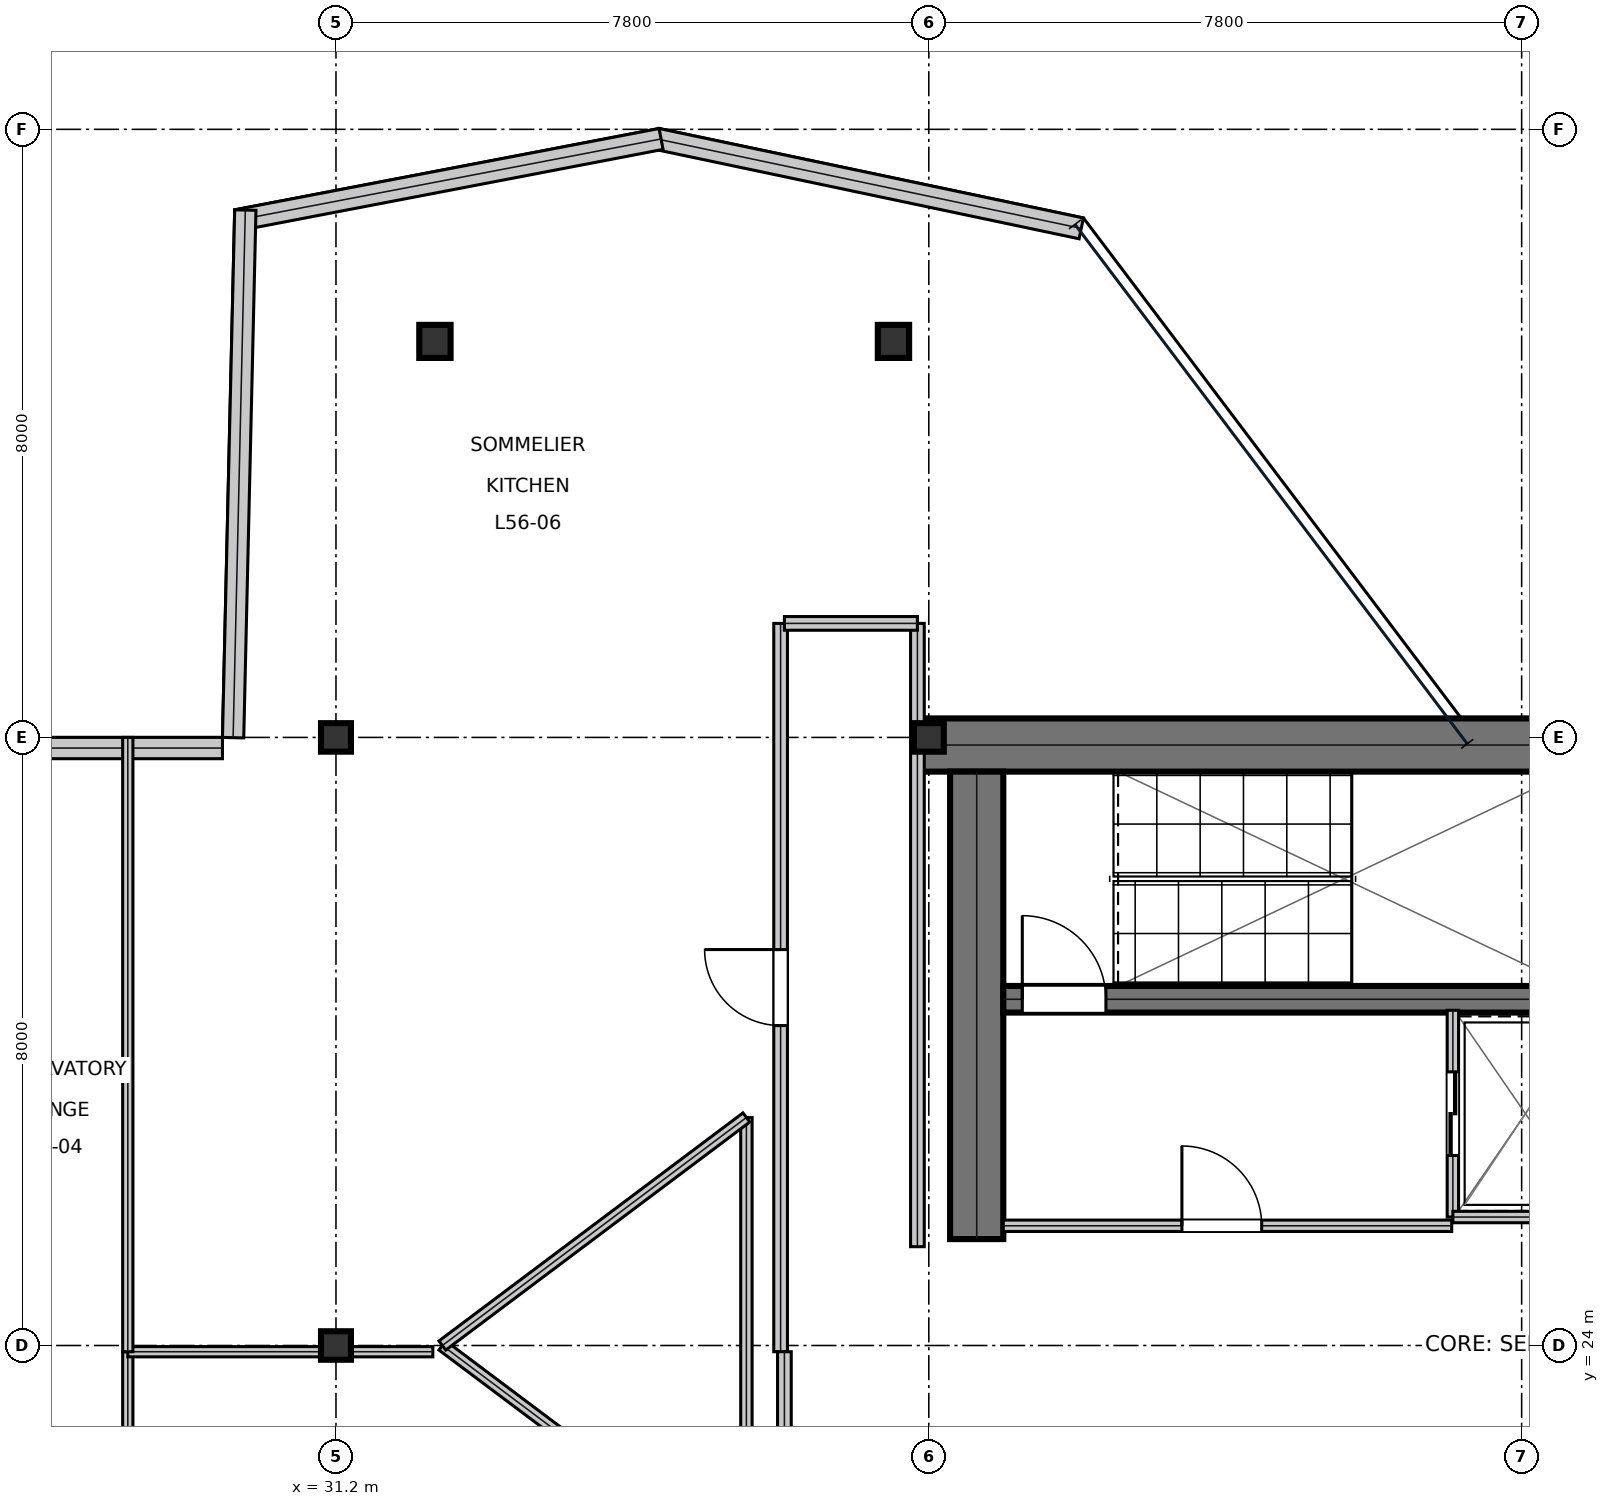
"""IFC4 building model, lengths in metres.
Left out: names, types, materials, properties, quantities, classifications, styles, units other than length and angle.
Written with IfcOpenShell. Run it as: python <this file> out.ifc"""

import sys

from ifc_helpers import new_model, si_unit, direction, frame, frame_2d, origin, origin_2d, place, context, subcontext, project, spatial, rectangle, i_section, extrude, element, fill, save


model = new_model("IFC4")
c1 = context("Model", 3, precision=1e-05, world=origin(), true_north=direction((0.0, 1.0)))
c2 = subcontext(c1, "Body", "Model", "MODEL_VIEW")
j1 = project(units=[si_unit("LENGTHUNIT", "METRE"), si_unit("PLANEANGLEUNIT", "RADIAN")], contexts=[c1])
p1 = place(None, origin())
s1 = spatial("IfcSite", under=j1, at=p1, CompositionType="ELEMENT")
p2 = place(p1, origin())
s2 = spatial("IfcBuilding", under=s1, at=p2, CompositionType="ELEMENT")
p3 = place(p2, frame((0.0, 0.0, 240.45)))
s3 = spatial("IfcBuildingStorey", under=s2, at=p3, CompositionType="ELEMENT", Elevation=240.45)
p4 = place(p3, frame((38.8, 31.9, 0.0), z_axis=(0.0, 0.0, 1.0), x_axis=(1.0, 0.0, 0.0)))
e1 = element("IfcWall", 1, at=p4, inside=s3, PredefinedType="SHEAR", context=c2, shape_type="SweptSolid", body=[
    extrude(rectangle(XDim=16.0, YDim=0.7, at=frame_2d((8.0, 0.0))), origin(), (0.0, 0.0, 1.0), 3.79),
])
p5 = place(p3, frame((39.63, 25.4, 0.0), z_axis=(0.0, 0.0, 1.0), x_axis=(0.0, 1.0, 0.0)))
e2 = element("IfcWall", 2, at=p5, inside=s3, PredefinedType="SHEAR", context=c2, shape_type="SweptSolid", body=[
    extrude(rectangle(XDim=6.15, YDim=0.7, at=frame_2d((3.075, 0.0))), origin(), (0.0, 0.0, 1.0), 3.79),
])
p6 = place(p3, frame((39.98, 28.555, 0.0), z_axis=(0.0, 0.0, 1.0), x_axis=(1.0, 0.0, 0.0)))
e3 = element("IfcWall", 3, at=p6, inside=s3, PredefinedType="SHEAR", context=c2, shape_type="SweptSolid", body=[
    extrude(rectangle(XDim=7.71, YDim=0.35, at=frame_2d((3.855, 0.0))), origin(), (0.0, 0.0, 1.0), 3.79),
])
p7 = place(p6, frame((0.25, 0.0, 0.0)))
e4 = element("IfcOpeningElement", 4, at=p7, cuts=e3, PredefinedType="OPENING", context=c2, shape_type="SweptSolid", body=[
    extrude(rectangle(XDim=1.1, YDim=2.15, at=frame_2d((0.55, 1.075))), frame((0.0, 0.185, 0.0), z_axis=(0.0, -1.0, 0.0), x_axis=(1.0, 0.0, 0.0)), (0.0, 0.0, 1.0), 0.37),
])
for number, where, z_axis, x_axis in (
    (5, (31.2, 24.0, 0.0), (0.0, 0.0, 1.0), (1.0, 0.0, 0.0)),
    (6, (31.2, 32.0, 0.0), (0.0, 0.0, 1.0), (1.0, 0.0, 0.0)),
    (7, (39.0, 32.0, 0.0), (0.0, 0.0, 1.0), (1.0, 0.0, 0.0)),
):
    element("IfcColumn", number, at=place(p3, frame(where, z_axis=z_axis, x_axis=x_axis)), inside=s3, PredefinedType="COLUMN", context=c2, shape_type="SweptSolid", body=[
        extrude(i_section(OverallWidth=0.394, OverallDepth=0.375, WebThickness=0.017, FlangeThickness=0.028, at=origin_2d()), origin(), (0.0, 0.0, 1.0), 4.044),
    ])
p8 = place(p3, frame((32.502, 37.21, 0.016), z_axis=(0.011844409997, -0.025389555788, 0.999607463162), x_axis=(0.906238519971, 0.422766773671, 0.0)))
e8 = element("IfcColumn", 8, at=p8, inside=s3, PredefinedType="COLUMN", context=c2, shape_type="SweptSolid", body=[
    extrude(i_section(OverallWidth=0.412, OverallDepth=0.435, WebThickness=0.036, FlangeThickness=0.058, at=origin_2d()), origin(), (0.0, 0.0, 1.0), 4.019),
])
p9 = place(p3, frame((38.535, 37.21, 0.016), z_axis=(-0.004191356121, -0.025391113895, 0.99966880709), x_axis=(0.986647914137, -0.162867717884, 0.0)))
e9 = element("IfcColumn", 9, at=p9, inside=s3, PredefinedType="COLUMN", context=c2, shape_type="SweptSolid", body=[
    extrude(i_section(OverallWidth=0.412, OverallDepth=0.435, WebThickness=0.036, FlangeThickness=0.058, at=origin_2d()), origin(), (0.0, 0.0, 1.0), 4.019),
])
p10 = place(p3, frame((41.006, 38.697, 0.0), z_axis=(0.0, 0.0, 1.0), x_axis=(-0.978497551098, 0.206258436179, 0.0)))
e10 = element("IfcWall", 10, at=p10, inside=s3, PredefinedType="STANDARD", context=c2, shape_type="SweptSolid", body=[
    extrude(rectangle(XDim=5.707, YDim=0.28, at=frame_2d((2.853, 0.0))), origin(), (0.0, 0.0, 1.0), 3.79),
])
p11 = place(p3, frame((35.477, 39.874, 0.0), z_axis=(0.0, 0.0, 1.0), x_axis=(-0.982127841111, -0.18821504646, 0.0)))
e11 = element("IfcWall", 11, at=p11, inside=s3, PredefinedType="STANDARD", context=c2, shape_type="SweptSolid", body=[
    extrude(rectangle(XDim=5.685, YDim=0.28, at=frame_2d((2.843, 0.0))), origin(), (0.0, 0.0, 1.0), 3.79),
])
p12 = place(p3, frame((30.007, 38.938, 0.0), z_axis=(0.0, 0.0, 1.0), x_axis=(-0.023173514979, -0.999731458044, 0.0)))
e12 = element("IfcWall", 12, at=p12, inside=s3, PredefinedType="STANDARD", context=c2, shape_type="SweptSolid", body=[
    extrude(rectangle(XDim=6.943, YDim=0.28, at=frame_2d((3.471, 0.0))), origin(), (0.0, 0.0, 1.0), 3.79),
])
p13 = place(p3, frame((29.707, 31.86, 0.0), z_axis=(0.0, 0.0, 1.0), x_axis=(-1.0, 0.0, 0.0)))
e13 = element("IfcWall", 13, at=p13, inside=s3, PredefinedType="STANDARD", context=c2, shape_type="SweptSolid", body=[
    extrude(rectangle(XDim=2.819, YDim=0.28, at=frame_2d((1.409, 0.0))), origin(), (0.0, 0.0, 1.0), 3.79),
])
p14 = place(p3, frame((39.98, 25.575, 0.0), z_axis=(0.0, 0.0, 1.0), x_axis=(1.0, 0.0, 0.0)))
e14 = element("IfcWall", 14, at=p14, inside=s3, PredefinedType="PARTITIONING", context=c2, shape_type="SweptSolid", body=[
    extrude(rectangle(XDim=5.9, YDim=0.15, at=frame_2d((2.95, 0.0))), origin(), (0.0, 0.0, 1.0), 3.79),
])
p15 = place(p14, frame((2.35, 0.0, 0.0)))
e15 = element("IfcOpeningElement", 15, at=p15, cuts=e14, PredefinedType="OPENING", context=c2, shape_type="SweptSolid", body=[
    extrude(rectangle(XDim=1.05, YDim=2.15, at=frame_2d((0.525, 1.075))), frame((0.0, 0.085, 0.0), z_axis=(0.0, -1.0, 0.0), x_axis=(1.0, 0.0, 0.0)), (0.0, 0.0, 1.0), 0.17),
])
p16 = place(p3, frame((45.895, 25.69, 0.0), z_axis=(0.0, 0.0, 1.0), x_axis=(0.0, 1.0, 0.0)))
e16 = element("IfcWall", 16, at=p16, inside=s3, PredefinedType="PARTITIONING", context=c2, shape_type="SweptSolid", body=[
    extrude(rectangle(XDim=2.72, YDim=0.15, at=frame_2d((1.36, 0.0))), origin(), (0.0, 0.0, 1.0), 3.79),
])
p17 = place(p16, frame((0.81, 0.0, 0.0)))
e17 = element("IfcOpeningElement", 17, at=p17, cuts=e16, PredefinedType="OPENING", context=c2, shape_type="SweptSolid", body=[
    extrude(rectangle(XDim=1.1, YDim=2.15, at=frame_2d((0.55, 1.075))), frame((0.0, 0.085, 0.0), z_axis=(0.0, -1.0, 0.0), x_axis=(1.0, 0.0, 0.0)), (0.0, 0.0, 1.0), 0.17),
])
p18 = place(p3, frame((45.895, 25.69, 0.0), z_axis=(0.0, 0.0, 1.0), x_axis=(1.0, 0.0, 0.0)))
e18 = element("IfcWall", 18, at=p18, inside=s3, PredefinedType="PARTITIONING", context=c2, shape_type="SweptSolid", body=[
    extrude(rectangle(XDim=1.915, YDim=0.15, at=frame_2d((0.958, 0.0))), origin(), (0.0, 0.0, 1.0), 3.79),
])
p19 = place(p3, frame((37.05, 23.918, 0.0), z_axis=(0.0, 0.0, 1.0), x_axis=(0.0, 1.0, 0.0)))
e19 = element("IfcWall", 19, at=p19, inside=s3, PredefinedType="SOLIDWALL", context=c2, shape_type="SweptSolid", body=[
    extrude(rectangle(XDim=9.582, YDim=0.18, at=frame_2d((4.791, 0.0))), origin(), (0.0, 0.0, 1.0), 3.241),
])
p20 = place(p19, frame((4.291, 0.0, 0.0)))
e20 = element("IfcOpeningElement", 20, at=p20, cuts=e19, PredefinedType="OPENING", context=c2, shape_type="SweptSolid", body=[
    extrude(rectangle(XDim=1.0, YDim=2.15, at=frame_2d((0.5, 1.075))), frame((0.0, 0.1, 0.0), z_axis=(0.0, -1.0, 0.0), x_axis=(1.0, 0.0, 0.0)), (0.0, 0.0, 1.0), 0.2),
])
p21 = place(p3, frame((37.1, 20.6, 0.0), z_axis=(0.0, 0.0, 1.0), x_axis=(0.0, 1.0, 0.0)))
e21 = element("IfcWall", 21, at=p21, inside=s3, PredefinedType="SOLIDWALL", context=c2, shape_type="SweptSolid", body=[
    extrude(rectangle(XDim=3.318, YDim=0.18, at=frame_2d((1.659, 0.0))), origin(), (0.0, 0.0, 1.0), 3.79),
])
p22 = place(p3, frame((38.85, 25.3, 0.0), z_axis=(0.0, 0.0, 1.0), x_axis=(0.0, 1.0, 0.0)))
e22 = element("IfcWall", 22, at=p22, inside=s3, PredefinedType="SOLIDWALL", context=c2, shape_type="SweptSolid", body=[
    extrude(rectangle(XDim=8.2, YDim=0.18, at=frame_2d((4.1, 0.0))), origin(), (0.0, 0.0, 1.0), 3.241),
])
p23 = place(p3, frame((37.1, 33.5, 0.0), z_axis=(0.0, 0.0, 1.0), x_axis=(1.0, 0.0, 0.0)))
e23 = element("IfcWall", 23, at=p23, inside=s3, PredefinedType="SOLIDWALL", context=c2, shape_type="SweptSolid", body=[
    extrude(rectangle(XDim=1.75, YDim=0.18, at=frame_2d((0.875, 0.0))), origin(), (0.0, 0.0, 1.0), 3.241),
])
p24 = place(p3, frame((28.461, 20.6, 0.0), z_axis=(0.0, 0.0, 1.0), x_axis=(0.0, 1.0, 0.0)))
e24 = element("IfcWall", 24, at=p24, inside=s3, PredefinedType="PARTITIONING", context=c2, shape_type="SweptSolid", body=[
    extrude(rectangle(XDim=3.318, YDim=0.135, at=frame_2d((1.659, 0.0))), origin(), (0.0, 0.0, 1.0), 3.241),
])
p25 = place(p3, frame((28.461, 23.918, 0.0), z_axis=(0.0, 0.0, 1.0), x_axis=(1.0, 0.0, 0.0)))
e25 = element("IfcWall", 25, at=p25, inside=s3, PredefinedType="PARTITIONING", context=c2, shape_type="SweptSolid", body=[
    extrude(rectangle(XDim=4.014, YDim=0.135, at=frame_2d((2.007, 0.0))), origin(), (0.0, 0.0, 1.0), 3.241),
])
p26 = place(p3, frame((28.461, 23.918, 0.0), z_axis=(0.0, 0.0, 1.0), x_axis=(0.0, 1.0, 0.0)))
e26 = element("IfcWall", 26, at=p26, inside=s3, PredefinedType="PARTITIONING", context=c2, shape_type="SweptSolid", body=[
    extrude(rectangle(XDim=8.082, YDim=0.135, at=frame_2d((4.041, 0.0))), origin(), (0.0, 0.0, 1.0), 3.241),
])
p27 = place(p3, frame((32.6, 24.0, 0.0), z_axis=(0.0, 0.0, 1.0), x_axis=(0.8, -0.6, 0.0)))
e27 = element("IfcWall", 27, at=p27, inside=s3, PredefinedType="MOVABLE", context=c2, shape_type="SweptSolid", body=[
    extrude(rectangle(XDim=5.0, YDim=0.15, at=frame_2d((2.5, 0.0))), origin(), (0.0, 0.0, 1.0), 3.79),
])
p28 = place(p3, frame((36.6, 21.0, 0.0), z_axis=(0.0, 0.0, 1.0), x_axis=(0.0, 1.0, 0.0)))
e28 = element("IfcWall", 28, at=p28, inside=s3, PredefinedType="MOVABLE", context=c2, shape_type="SweptSolid", body=[
    extrude(rectangle(XDim=6.0, YDim=0.15, at=frame_2d((3.0, 0.0))), origin(), (0.0, 0.0, 1.0), 3.79),
])
p29 = place(p3, frame((36.6, 27.0, 0.0), z_axis=(0.0, 0.0, 1.0), x_axis=(-0.8, -0.6, 0.0)))
e29 = element("IfcWall", 29, at=p29, inside=s3, PredefinedType="MOVABLE", context=c2, shape_type="SweptSolid", body=[
    extrude(rectangle(XDim=5.0, YDim=0.15, at=frame_2d((2.5, 0.0))), origin(), (0.0, 0.0, 1.0), 3.79),
])
p30 = place(p15, origin())
e30 = element("IfcDoor", 30, at=p30, inside=s3, OperationType="SINGLE_SWING_LEFT", PredefinedType="DOOR", context=c2, shape_type="SweptSolid", body=[
    extrude(rectangle(XDim=1.05, YDim=2.15, at=frame_2d((0.525, 1.075))), frame((0.0, 0.025, 0.0), z_axis=(0.0, -1.0, 0.0), x_axis=(1.0, 0.0, 0.0)), (0.0, 0.0, 1.0), 0.05),
])
fill(e15, e30)
p31 = place(p17, frame((1.1, 0.0, 0.0), z_axis=(0.0, 0.0, 1.0), x_axis=(-1.0, 0.0, 0.0)))
e31 = element("IfcDoor", 31, at=p31, inside=s3, OperationType="DOUBLE_DOOR_SLIDING", PredefinedType="DOOR", context=c2, shape_type="SweptSolid", body=[
    extrude(rectangle(XDim=1.1, YDim=2.15, at=frame_2d((0.55, 1.075))), frame((0.0, 0.025, 0.0), z_axis=(0.0, -1.0, 0.0), x_axis=(1.0, 0.0, 0.0)), (0.0, 0.0, 1.0), 0.05),
])
fill(e17, e31)
p32 = place(p20, origin())
e32 = element("IfcDoor", 32, at=p32, inside=s3, OperationType="SINGLE_SWING_RIGHT", PredefinedType="DOOR", context=c2, shape_type="SweptSolid", body=[
    extrude(rectangle(XDim=1.0, YDim=2.15, at=frame_2d((0.5, 1.075))), frame((0.0, 0.025, 0.0), z_axis=(0.0, -1.0, 0.0), x_axis=(1.0, 0.0, 0.0)), (0.0, 0.0, 1.0), 0.05),
])
fill(e20, e32)
p33 = place(p7, origin())
e33 = element("IfcDoor", 33, at=p33, inside=s3, OperationType="SINGLE_SWING_LEFT", PredefinedType="DOOR", context=c2, shape_type="SweptSolid", body=[
    extrude(rectangle(XDim=1.1, YDim=2.15, at=frame_2d((0.55, 1.075))), frame((0.0, 0.025, 0.0), z_axis=(0.0, -1.0, 0.0), x_axis=(1.0, 0.0, 0.0)), (0.0, 0.0, 1.0), 0.05),
])
fill(e4, e33)
save(model, sys.argv[1])
